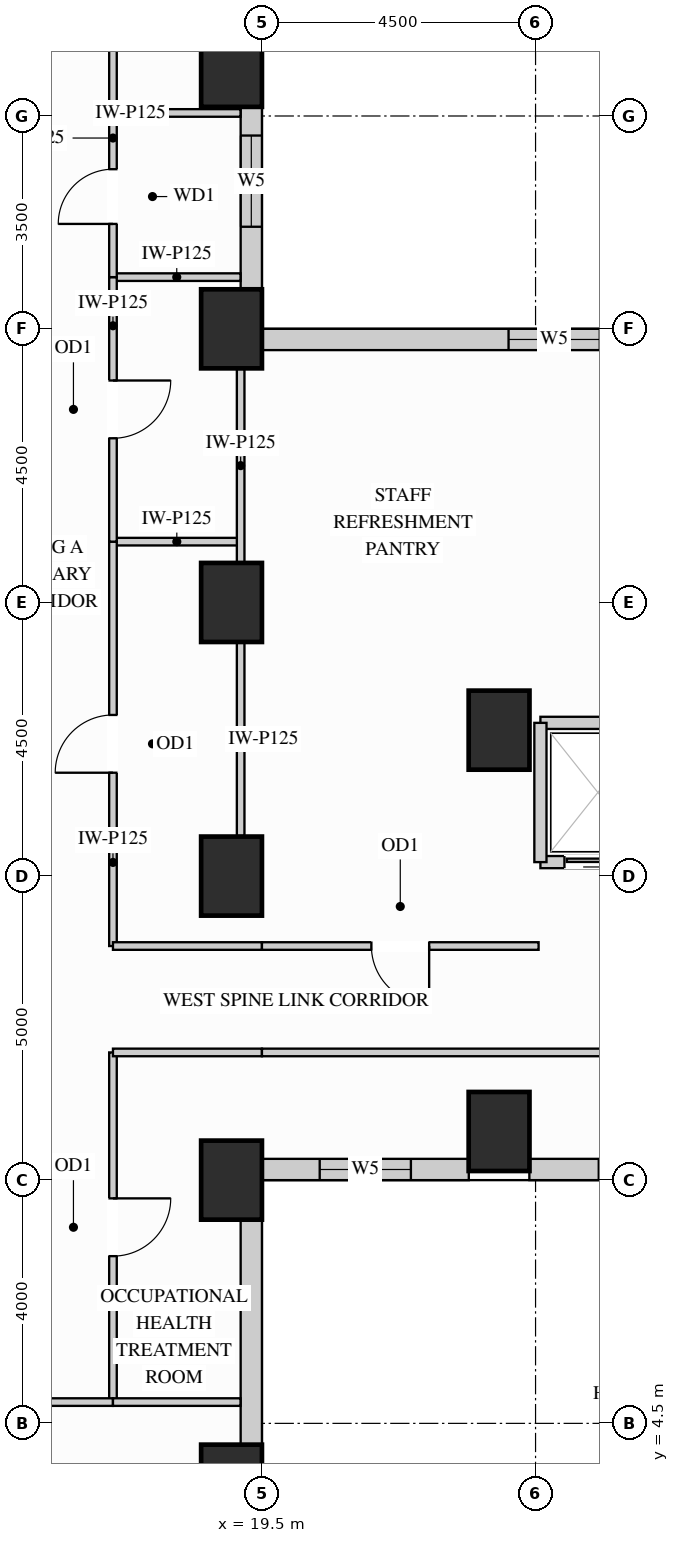
"""IFC4 building model, lengths in metres.
Left out: names, types, materials, properties, quantities, classifications, styles, units other than length and angle.
Written with IfcOpenShell. Run it as: python <this file> out.ifc"""

import sys

from ifc_helpers import new_model, si_unit, direction, frame, frame_2d, origin, origin_2d, place, context, subcontext, project, spatial, rectangle, extrude, source, transform, mapped, element, fill, save


model = new_model("IFC4")
c1 = context("Model", 3, precision=1e-05, world=origin(), true_north=direction((0.0, 1.0)))
c2 = subcontext(c1, "Body", "Model", "MODEL_VIEW")
j1 = project(units=[si_unit("LENGTHUNIT", "METRE"), si_unit("PLANEANGLEUNIT", "RADIAN")], contexts=[c1])
p1 = place(None, origin())
s1 = spatial("IfcSite", under=j1, at=p1, CompositionType="ELEMENT")
p2 = place(p1, origin())
s2 = spatial("IfcBuilding", under=s1, at=p2, CompositionType="ELEMENT")
p3 = place(p2, frame((0.0, 0.0, 33.3)))
s3 = spatial("IfcBuildingStorey", under=s2, at=p3, CompositionType="ELEMENT", Elevation=33.3)
m1 = source(origin(), c2, "Body", "SweptSolid", [
    extrude(rectangle(XDim=1.0, YDim=1.3, at=origin_2d()), origin(), (0.0, 0.0, 1.0), 3.38),
])
for number, where, z_axis, x_axis in (
    (1, (19.0, 13.5, 0.0), (0.0, 0.0, 1.0), (1.0, 0.0, 0.0)),
    (2, (19.0, 18.0, 0.0), (0.0, 0.0, 1.0), (1.0, 0.0, 0.0)),
    (3, (19.0, 22.5, 0.0), (0.0, 0.0, 1.0), (1.0, 0.0, 0.0)),
    (4, (19.0, 26.8, 0.0), (0.0, 0.0, 1.0), (1.0, 0.0, 0.0)),
    (5, (19.0, 3.5, 0.0), (0.0, 0.0, 1.0), (1.0, 0.0, 0.0)),
    (6, (19.0, 8.5, 0.0), (0.0, 0.0, 1.0), (1.0, 0.0, 0.0)),
    (7, (23.4, 15.9, 0.0), (0.0, 0.0, 1.0), (1.0, 0.0, 0.0)),
    (8, (23.4, 9.3, 0.0), (0.0, 0.0, 1.0), (1.0, 0.0, 0.0)),
):
    element("IfcColumn", number, at=place(p3, frame(where, z_axis=z_axis, x_axis=x_axis)), inside=s3, PredefinedType="COLUMN", context=c2, shape_type="MappedRepresentation", body=[
        mapped(m1, transform((0.0, 0.0, 0.0), x_axis=(1.0, 0.0, 0.0), y_axis=(0.0, 1.0, 0.0), z_axis=(0.0, 0.0, 1.0))),
    ])
m2 = source(origin(), c2, "Body", "SweptSolid", [
    extrude(rectangle(XDim=3.704, YDim=0.35, at=frame_2d((1.852, 0.0))), origin(), (0.0, 0.0, 1.0), 2.51),
])
p4 = place(p3, frame((19.325, 4.148, 0.0), z_axis=(0.0, 0.0, 1.0), x_axis=(0.0, 1.0, 0.0)))
e9 = element("IfcWall", 9, at=p4, inside=s3, PredefinedType="SOLIDWALL", context=c2, shape_type="MappedRepresentation", body=[
    mapped(m2, transform((0.0, 0.0, 0.0), x_axis=(1.0, 0.0, 0.0), y_axis=(0.0, 1.0, 0.0), z_axis=(0.0, 0.0, 1.0))),
])
p5 = place(p3, frame((19.498, 8.675, 0.0), z_axis=(0.0, 0.0, 1.0), x_axis=(1.0, 0.0, 0.0)))
e10 = element("IfcWall", 10, at=p5, inside=s3, PredefinedType="SOLIDWALL", context=c2, shape_type="SweptSolid", body=[
    extrude(rectangle(XDim=3.404, YDim=0.35, at=frame_2d((1.702, 0.0))), origin(), (0.0, 0.0, 1.0), 3.365),
])
p6 = place(p5, frame((0.952, 0.0, 0.78)))
e11 = element("IfcOpeningElement", 11, at=p6, cuts=e10, PredefinedType="OPENING", context=c2, shape_type="SweptSolid", body=[
    extrude(rectangle(XDim=1.5, YDim=2.0, at=frame_2d((0.75, 1.0))), frame((0.0, 0.185, 0.0), z_axis=(0.0, -1.0, 0.0), x_axis=(1.0, 0.0, 0.0)), (0.0, 0.0, 1.0), 0.37),
])
p7 = place(p3, frame((23.898, 8.675, 0.0), z_axis=(0.0, 0.0, 1.0), x_axis=(1.0, 0.0, 0.0)))
e12 = element("IfcWall", 12, at=p7, inside=s3, PredefinedType="SOLIDWALL", context=c2, shape_type="SweptSolid", body=[
    extrude(rectangle(XDim=6.104, YDim=0.35, at=frame_2d((3.052, 0.0))), origin(), (0.0, 0.0, 1.0), 3.365),
])
p8 = place(p7, frame((1.141, 0.0, 0.78)))
e13 = element("IfcOpeningElement", 13, at=p8, cuts=e12, PredefinedType="OPENING", context=c2, shape_type="SweptSolid", body=[
    extrude(rectangle(XDim=1.5, YDim=2.0, at=frame_2d((0.75, 1.0))), frame((0.0, 0.185, 0.0), z_axis=(0.0, -1.0, 0.0), x_axis=(1.0, 0.0, 0.0)), (0.0, 0.0, 1.0), 0.37),
])
p9 = place(p7, frame((3.463, 0.0, 0.78)))
e14 = element("IfcOpeningElement", 14, at=p9, cuts=e12, PredefinedType="OPENING", context=c2, shape_type="SweptSolid", body=[
    extrude(rectangle(XDim=1.5, YDim=2.0, at=frame_2d((0.75, 1.0))), frame((0.0, 0.185, 0.0), z_axis=(0.0, -1.0, 0.0), x_axis=(1.0, 0.0, 0.0)), (0.0, 0.0, 1.0), 0.37),
])
p10 = place(p3, frame((34.352, 22.325, 0.0), z_axis=(0.0, 0.0, 1.0), x_axis=(-1.0, 0.0, 0.0)))
e15 = element("IfcWall", 15, at=p10, inside=s3, PredefinedType="SOLIDWALL", context=c2, shape_type="SweptSolid", body=[
    extrude(rectangle(XDim=14.854, YDim=0.35, at=frame_2d((7.427, 0.0))), origin(), (0.0, 0.0, 1.0), 3.365),
])
p11 = place(p10, frame((4.058, 0.0, 0.78)))
e16 = element("IfcOpeningElement", 16, at=p11, cuts=e15, PredefinedType="OPENING", context=c2, shape_type="SweptSolid", body=[
    extrude(rectangle(XDim=1.5, YDim=2.0, at=frame_2d((0.75, 1.0))), frame((0.0, 0.185, 0.0), z_axis=(0.0, -1.0, 0.0), x_axis=(1.0, 0.0, 0.0)), (0.0, 0.0, 1.0), 0.37),
])
p12 = place(p10, frame((9.296, 0.0, 0.78)))
e17 = element("IfcOpeningElement", 17, at=p12, cuts=e15, PredefinedType="OPENING", context=c2, shape_type="SweptSolid", body=[
    extrude(rectangle(XDim=1.5, YDim=2.0, at=frame_2d((0.75, 1.0))), frame((0.0, 0.185, 0.0), z_axis=(0.0, -1.0, 0.0), x_axis=(1.0, 0.0, 0.0)), (0.0, 0.0, 1.0), 0.37),
])
p13 = place(p3, frame((19.325, 23.148, 0.0), z_axis=(0.0, 0.0, 1.0), x_axis=(0.0, 1.0, 0.0)))
e18 = element("IfcWall", 18, at=p13, inside=s3, PredefinedType="SOLIDWALL", context=c2, shape_type="SweptSolid", body=[
    extrude(rectangle(XDim=3.004, YDim=0.35, at=frame_2d((1.502, 0.0))), origin(), (0.0, 0.0, 1.0), 2.51),
])
p14 = place(p13, frame((1.031, 0.0, 0.78)))
e19 = element("IfcOpeningElement", 19, at=p14, cuts=e18, PredefinedType="OPENING", context=c2, shape_type="SweptSolid", body=[
    extrude(rectangle(XDim=1.5, YDim=1.55, at=frame_2d((0.75, 0.775))), frame((0.0, 0.185, 0.0), z_axis=(0.0, -1.0, 0.0), x_axis=(1.0, 0.0, 0.0)), (0.0, 0.0, 1.0), 0.37),
])
m3 = source(origin(), c2, "Body", "SweptSolid", [
    extrude(rectangle(XDim=2.1, YDim=0.125, at=frame_2d((1.05, 0.0))), origin(), (0.0, 0.0, 1.0), 3.365),
])
p15 = place(p3, frame((17.05, 19.0, 0.0), z_axis=(0.0, 0.0, 1.0), x_axis=(1.0, 0.0, 0.0)))
e20 = element("IfcWall", 20, at=p15, inside=s3, PredefinedType="PARTITIONING", context=c2, shape_type="MappedRepresentation", body=[
    mapped(m3, transform((0.0, 0.0, 0.0), x_axis=(1.0, 0.0, 0.0), y_axis=(0.0, 1.0, 0.0), z_axis=(0.0, 0.0, 1.0))),
])
m4 = source(origin(), c2, "Body", "SweptSolid", [
    extrude(rectangle(XDim=2.098, YDim=0.125, at=frame_2d((1.049, 0.0))), origin(), (0.0, 0.0, 1.0), 3.365),
])
for number, where, z_axis, x_axis in (
    (21, (17.05, 23.35, 0.0), (0.0, 0.0, 1.0), (1.0, 0.0, 0.0)),
    (22, (17.05, 26.05, 0.0), (0.0, 0.0, 1.0), (1.0, 0.0, 0.0)),
):
    element("IfcWall", number, at=place(p3, frame(where, z_axis=z_axis, x_axis=x_axis)), inside=s3, PredefinedType="PARTITIONING", context=c2, shape_type="MappedRepresentation", body=[
        mapped(m4, transform((0.0, 0.0, 0.0), x_axis=(1.0, 0.0, 0.0), y_axis=(0.0, 1.0, 0.0), z_axis=(0.0, 0.0, 1.0))),
    ])
m5 = source(origin(), c2, "Body", "SweptSolid", [
    extrude(rectangle(XDim=3.18, YDim=0.125, at=frame_2d((1.59, 0.0))), origin(), (0.0, 0.0, 1.0), 2.67),
])
for number, where, z_axis, x_axis in (
    (23, (19.15, 14.16, 0.0), (0.0, 0.0, 1.0), (0.0, 1.0, 0.0)),
    (24, (19.15, 18.66, 0.0), (0.0, 0.0, 1.0), (0.0, 1.0, 0.0)),
):
    element("IfcWall", number, at=place(p3, frame(where, z_axis=z_axis, x_axis=x_axis)), inside=s3, PredefinedType="PARTITIONING", context=c2, shape_type="MappedRepresentation", body=[
        mapped(m5, transform((0.0, 0.0, 0.0), x_axis=(1.0, 0.0, 0.0), y_axis=(0.0, 1.0, 0.0), z_axis=(0.0, 0.0, 1.0))),
    ])
p16 = place(p3, frame((17.05, 12.35, 0.0), z_axis=(0.0, 0.0, 1.0), x_axis=(0.0, 1.0, 0.0)))
e25 = element("IfcWall", 25, at=p16, inside=s3, PredefinedType="PARTITIONING", context=c2, shape_type="SweptSolid", body=[
    extrude(rectangle(XDim=6.65, YDim=0.125, at=frame_2d((3.325, 0.0))), origin(), (0.0, 0.0, 1.0), 3.365),
])
p17 = place(p16, frame((2.85, 0.0, 0.0)))
e26 = element("IfcOpeningElement", 26, at=p17, cuts=e25, PredefinedType="OPENING", context=c2, shape_type="SweptSolid", body=[
    extrude(rectangle(XDim=0.95, YDim=2.15, at=frame_2d((0.475, 1.075))), frame((0.0, 0.073, 0.0), z_axis=(0.0, -1.0, 0.0), x_axis=(1.0, 0.0, 0.0)), (0.0, 0.0, 1.0), 0.145),
])
p18 = place(p3, frame((17.05, 19.0, 0.0), z_axis=(0.0, 0.0, 1.0), x_axis=(0.0, 1.0, 0.0)))
e27 = element("IfcWall", 27, at=p18, inside=s3, PredefinedType="PARTITIONING", context=c2, shape_type="SweptSolid", body=[
    extrude(rectangle(XDim=4.35, YDim=0.125, at=frame_2d((2.175, 0.0))), origin(), (0.0, 0.0, 1.0), 3.365),
])
p19 = place(p18, frame((1.7, 0.0, 0.0)))
e28 = element("IfcOpeningElement", 28, at=p19, cuts=e27, PredefinedType="OPENING", context=c2, shape_type="SweptSolid", body=[
    extrude(rectangle(XDim=0.95, YDim=2.15, at=frame_2d((0.475, 1.075))), frame((0.0, 0.073, 0.0), z_axis=(0.0, -1.0, 0.0), x_axis=(1.0, 0.0, 0.0)), (0.0, 0.0, 1.0), 0.145),
])
p20 = place(p3, frame((17.05, 26.05, 0.0), z_axis=(0.0, 0.0, 1.0), x_axis=(0.0, 1.0, 0.0)))
e29 = element("IfcWall", 29, at=p20, inside=s3, PredefinedType="PARTITIONING", context=c2, shape_type="SweptSolid", body=[
    extrude(rectangle(XDim=7.2, YDim=0.125, at=frame_2d((3.6, 0.0))), origin(), (0.0, 0.0, 1.0), 3.365),
])
p21 = place(p20, frame((3.125, 0.0, 0.0)))
e30 = element("IfcOpeningElement", 30, at=p21, cuts=e29, PredefinedType="OPENING", context=c2, shape_type="SweptSolid", body=[
    extrude(rectangle(XDim=0.95, YDim=2.15, at=frame_2d((0.475, 1.075))), frame((0.0, 0.073, 0.0), z_axis=(0.0, -1.0, 0.0), x_axis=(1.0, 0.0, 0.0)), (0.0, 0.0, 1.0), 0.145),
])
p22 = place(p3, frame((17.05, 4.85, 0.0), z_axis=(0.0, 0.0, 1.0), x_axis=(0.0, 1.0, 0.0)))
e31 = element("IfcWall", 31, at=p22, inside=s3, PredefinedType="PARTITIONING", context=c2, shape_type="SweptSolid", body=[
    extrude(rectangle(XDim=5.75, YDim=0.125, at=frame_2d((2.875, 0.0))), origin(), (0.0, 0.0, 1.0), 3.365),
])
p23 = place(p22, frame((2.4, 0.0, 0.0)))
e32 = element("IfcOpeningElement", 32, at=p23, cuts=e31, PredefinedType="OPENING", context=c2, shape_type="SweptSolid", body=[
    extrude(rectangle(XDim=0.95, YDim=2.15, at=frame_2d((0.475, 1.075))), frame((0.0, 0.073, 0.0), z_axis=(0.0, -1.0, 0.0), x_axis=(1.0, 0.0, 0.0)), (0.0, 0.0, 1.0), 0.145),
])
p24 = place(p3, frame((17.05, 23.35, 0.0), z_axis=(0.0, 0.0, 1.0), x_axis=(0.0, 1.0, 0.0)))
e33 = element("IfcWall", 33, at=p24, inside=s3, PredefinedType="PARTITIONING", context=c2, shape_type="SweptSolid", body=[
    extrude(rectangle(XDim=2.7, YDim=0.125, at=frame_2d((1.35, 0.0))), origin(), (0.0, 0.0, 1.0), 3.365),
])
p25 = place(p24, frame((0.875, 0.0, 0.0)))
e34 = element("IfcOpeningElement", 34, at=p25, cuts=e33, PredefinedType="OPENING", context=c2, shape_type="SweptSolid", body=[
    extrude(rectangle(XDim=0.9, YDim=2.15, at=frame_2d((0.45, 1.075))), frame((0.0, 0.073, 0.0), z_axis=(0.0, -1.0, 0.0), x_axis=(1.0, 0.0, 0.0)), (0.0, 0.0, 1.0), 0.145),
])
m6 = source(origin(), c2, "Body", "SweptSolid", [
    extrude(rectangle(XDim=2.45, YDim=0.125, at=frame_2d((1.225, 0.0))), origin(), (0.0, 0.0, 1.0), 3.365),
])
p26 = place(p3, frame((17.05, 12.35, 0.0), z_axis=(0.0, 0.0, 1.0), x_axis=(1.0, 0.0, 0.0)))
e35 = element("IfcWall", 35, at=p26, inside=s3, PredefinedType="PARTITIONING", context=c2, shape_type="MappedRepresentation", body=[
    mapped(m6, transform((0.0, 0.0, 0.0), x_axis=(1.0, 0.0, 0.0), y_axis=(0.0, 1.0, 0.0), z_axis=(0.0, 0.0, 1.0))),
])
p27 = place(p3, frame((19.5, 12.35, 0.0), z_axis=(0.0, 0.0, 1.0), x_axis=(1.0, 0.0, 0.0)))
e36 = element("IfcWall", 36, at=p27, inside=s3, PredefinedType="PARTITIONING", context=c2, shape_type="SweptSolid", body=[
    extrude(rectangle(XDim=4.55, YDim=0.125, at=frame_2d((2.275, 0.0))), origin(), (0.0, 0.0, 1.0), 3.365),
])
p28 = place(p27, frame((1.8, 0.0, 0.0)))
e37 = element("IfcOpeningElement", 37, at=p28, cuts=e36, PredefinedType="OPENING", context=c2, shape_type="SweptSolid", body=[
    extrude(rectangle(XDim=0.95, YDim=2.15, at=frame_2d((0.475, 1.075))), frame((0.0, 0.073, 0.0), z_axis=(0.0, -1.0, 0.0), x_axis=(1.0, 0.0, 0.0)), (0.0, 0.0, 1.0), 0.145),
])
p29 = place(p3, frame((17.05, 10.6, 0.0), z_axis=(0.0, 0.0, 1.0), x_axis=(1.0, 0.0, 0.0)))
e38 = element("IfcWall", 38, at=p29, inside=s3, PredefinedType="PARTITIONING", context=c2, shape_type="MappedRepresentation", body=[
    mapped(m6, transform((0.0, 0.0, 0.0), x_axis=(1.0, 0.0, 0.0), y_axis=(0.0, 1.0, 0.0), z_axis=(0.0, 0.0, 1.0))),
])
p30 = place(p3, frame((19.5, 10.6, 0.0), z_axis=(0.0, 0.0, 1.0), x_axis=(1.0, 0.0, 0.0)))
e39 = element("IfcWall", 39, at=p30, inside=s3, PredefinedType="PARTITIONING", context=c2, shape_type="SweptSolid", body=[
    extrude(rectangle(XDim=14.9, YDim=0.125, at=frame_2d((7.45, 0.0))), origin(), (0.0, 0.0, 1.0), 3.365),
])
p31 = place(p30, frame((6.975, 0.0, 0.0)))
e40 = element("IfcOpeningElement", 40, at=p31, cuts=e39, PredefinedType="OPENING", context=c2, shape_type="SweptSolid", body=[
    extrude(rectangle(XDim=0.95, YDim=2.15, at=frame_2d((0.475, 1.075))), frame((0.0, 0.073, 0.0), z_axis=(0.0, -1.0, 0.0), x_axis=(1.0, 0.0, 0.0)), (0.0, 0.0, 1.0), 0.145),
])
p32 = place(p3, frame((2.45, 4.85, 0.0), z_axis=(0.0, 0.0, 1.0), x_axis=(1.0, 0.0, 0.0)))
e41 = element("IfcWall", 41, at=p32, inside=s3, PredefinedType="PARTITIONING", context=c2, shape_type="SweptSolid", body=[
    extrude(rectangle(XDim=14.6, YDim=0.125, at=frame_2d((7.3, 0.0))), origin(), (0.0, 0.0, 1.0), 2.828),
])
p33 = place(p32, frame((6.825, 0.0, 0.0)))
e42 = element("IfcOpeningElement", 42, at=p33, cuts=e41, PredefinedType="OPENING", context=c2, shape_type="SweptSolid", body=[
    extrude(rectangle(XDim=0.95, YDim=2.15, at=frame_2d((0.475, 1.075))), frame((0.0, 0.073, 0.0), z_axis=(0.0, -1.0, 0.0), x_axis=(1.0, 0.0, 0.0)), (0.0, 0.0, 1.0), 0.145),
])
m7 = source(origin(), c2, "Body", "SweptSolid", [
    extrude(rectangle(XDim=2.098, YDim=0.125, at=frame_2d((1.049, 0.0))), origin(), (0.0, 0.0, 1.0), 2.828),
])
p34 = place(p3, frame((17.05, 4.85, 0.0), z_axis=(0.0, 0.0, 1.0), x_axis=(1.0, 0.0, 0.0)))
e43 = element("IfcWall", 43, at=p34, inside=s3, PredefinedType="PARTITIONING", context=c2, shape_type="MappedRepresentation", body=[
    mapped(m7, transform((0.0, 0.0, 0.0), x_axis=(1.0, 0.0, 0.0), y_axis=(0.0, 1.0, 0.0), z_axis=(0.0, 0.0, 1.0))),
])
m8 = source(origin(), c2, "Body", "SweptSolid", [
    extrude(rectangle(XDim=1.89, YDim=0.2, at=frame_2d((0.945, 0.0))), origin(), (0.0, 0.0, 1.0), 2.67),
])
p35 = place(p3, frame((24.08, 16.02, 0.0), z_axis=(0.0, 0.0, 1.0), x_axis=(1.0, 0.0, 0.0)))
e44 = element("IfcWall", 44, at=p35, inside=s3, PredefinedType="PARTITIONING", context=c2, shape_type="MappedRepresentation", body=[
    mapped(m8, transform((0.0, 0.0, 0.0), x_axis=(1.0, 0.0, 0.0), y_axis=(0.0, 1.0, 0.0), z_axis=(0.0, 0.0, 1.0))),
])
p36 = place(p3, frame((24.08, 13.73, 0.0), z_axis=(0.0, 0.0, 1.0), x_axis=(1.0, 0.0, 0.0)))
e45 = element("IfcWall", 45, at=p36, inside=s3, PredefinedType="PARTITIONING", context=c2, shape_type="SweptSolid", body=[
    extrude(rectangle(XDim=1.89, YDim=0.2, at=frame_2d((0.945, 0.0))), origin(), (0.0, 0.0, 1.0), 2.446),
])
p37 = place(p36, frame((0.395, 0.0, 0.0)))
e46 = element("IfcOpeningElement", 46, at=p37, cuts=e45, PredefinedType="OPENING", context=c2, shape_type="SweptSolid", body=[
    extrude(rectangle(XDim=1.1, YDim=2.2, at=frame_2d((0.55, 1.1))), frame((0.0, 0.11, 0.0), z_axis=(0.0, -1.0, 0.0), x_axis=(1.0, 0.0, 0.0)), (0.0, 0.0, 1.0), 0.22),
])
m9 = source(origin(), c2, "Body", "SweptSolid", [
    extrude(rectangle(XDim=2.29, YDim=0.2, at=frame_2d((1.145, 0.0))), origin(), (0.0, 0.0, 1.0), 3.365),
])
p38 = place(p3, frame((24.08, 13.73, 0.0), z_axis=(0.0, 0.0, 1.0), x_axis=(0.0, 1.0, 0.0)))
e47 = element("IfcWall", 47, at=p38, inside=s3, PredefinedType="PARTITIONING", context=c2, shape_type="MappedRepresentation", body=[
    mapped(m9, transform((0.0, 0.0, 0.0), x_axis=(1.0, 0.0, 0.0), y_axis=(0.0, 1.0, 0.0), z_axis=(0.0, 0.0, 1.0))),
])
m10 = source(origin(), c2, "Body", "SweptSolid", [
    extrude(rectangle(XDim=1.1, YDim=2.2, at=frame_2d((0.55, 1.1))), frame((0.0, 0.025, 0.0), z_axis=(0.0, -1.0, 0.0), x_axis=(1.0, 0.0, 0.0)), (0.0, 0.0, 1.0), 0.05),
])
p39 = place(p37, origin())
e48 = element("IfcDoor", 48, at=p39, inside=s3, OperationType="SLIDING_TO_LEFT", PredefinedType="DOOR", context=c2, shape_type="MappedRepresentation", body=[
    mapped(m10, transform((0.0, 0.0, 0.0), x_axis=(1.0, 0.0, 0.0), y_axis=(0.0, 1.0, 0.0), z_axis=(0.0, 0.0, 1.0))),
])
fill(e46, e48)
m11 = source(origin(), c2, "Body", "SweptSolid", [
    extrude(rectangle(XDim=0.95, YDim=2.15, at=frame_2d((0.475, 1.075))), frame((0.0, 0.025, 0.0), z_axis=(0.0, -1.0, 0.0), x_axis=(1.0, 0.0, 0.0)), (0.0, 0.0, 1.0), 0.05),
])
p40 = place(p23, origin())
e49 = element("IfcDoor", 49, at=p40, inside=s3, OperationType="SINGLE_SWING_RIGHT", PredefinedType="DOOR", context=c2, shape_type="MappedRepresentation", body=[
    mapped(m11, transform((0.0, 0.0, 0.0), x_axis=(1.0, 0.0, 0.0), y_axis=(0.0, 1.0, 0.0), z_axis=(0.0, 0.0, 1.0))),
])
fill(e32, e49)
p41 = place(p17, origin())
e50 = element("IfcDoor", 50, at=p41, inside=s3, OperationType="SINGLE_SWING_LEFT", PredefinedType="DOOR", context=c2, shape_type="MappedRepresentation", body=[
    mapped(m11, transform((0.0, 0.0, 0.0), x_axis=(1.0, 0.0, 0.0), y_axis=(0.0, 1.0, 0.0), z_axis=(0.0, 0.0, 1.0))),
])
fill(e26, e50)
p42 = place(p19, origin())
e51 = element("IfcDoor", 51, at=p42, inside=s3, OperationType="SINGLE_SWING_RIGHT", PredefinedType="DOOR", context=c2, shape_type="MappedRepresentation", body=[
    mapped(m11, transform((0.0, 0.0, 0.0), x_axis=(1.0, 0.0, 0.0), y_axis=(0.0, 1.0, 0.0), z_axis=(0.0, 0.0, 1.0))),
])
fill(e28, e51)
p43 = place(p28, origin())
e52 = element("IfcDoor", 52, at=p43, inside=s3, OperationType="SINGLE_SWING_RIGHT", PredefinedType="DOOR", context=c2, shape_type="MappedRepresentation", body=[
    mapped(m11, transform((0.0, 0.0, 0.0), x_axis=(1.0, 0.0, 0.0), y_axis=(0.0, 1.0, 0.0), z_axis=(0.0, 0.0, 1.0))),
])
fill(e37, e52)
m12 = source(origin(), c2, "Body", "SweptSolid", [
    extrude(rectangle(XDim=0.9, YDim=2.15, at=frame_2d((0.45, 1.075))), frame((0.0, 0.025, 0.0), z_axis=(0.0, -1.0, 0.0), x_axis=(1.0, 0.0, 0.0)), (0.0, 0.0, 1.0), 0.05),
])
p44 = place(p25, origin())
e53 = element("IfcDoor", 53, at=p44, inside=s3, OperationType="SINGLE_SWING_LEFT", PredefinedType="DOOR", context=c2, shape_type="MappedRepresentation", body=[
    mapped(m12, transform((0.0, 0.0, 0.0), x_axis=(1.0, 0.0, 0.0), y_axis=(0.0, 1.0, 0.0), z_axis=(0.0, 0.0, 1.0))),
])
fill(e34, e53)
m13 = source(origin(), c2, "Body", "SweptSolid", [
    extrude(rectangle(XDim=1.5, YDim=2.0, at=frame_2d((0.75, 1.0))), frame((0.0, 0.03, 0.0), z_axis=(0.0, -1.0, 0.0), x_axis=(1.0, 0.0, 0.0)), (0.0, 0.0, 1.0), 0.06),
])
p45 = place(p6, origin())
e54 = element("IfcWindow", 54, at=p45, inside=s3, PartitioningType="SINGLE_PANEL", PredefinedType="WINDOW", context=c2, shape_type="MappedRepresentation", body=[
    mapped(m13, transform((0.0, 0.0, 0.0), x_axis=(1.0, 0.0, 0.0), y_axis=(0.0, 1.0, 0.0), z_axis=(0.0, 0.0, 1.0))),
])
fill(e11, e54)
p46 = place(p8, origin())
e55 = element("IfcWindow", 55, at=p46, inside=s3, PartitioningType="SINGLE_PANEL", PredefinedType="WINDOW", context=c2, shape_type="MappedRepresentation", body=[
    mapped(m13, transform((0.0, 0.0, 0.0), x_axis=(1.0, 0.0, 0.0), y_axis=(0.0, 1.0, 0.0), z_axis=(0.0, 0.0, 1.0))),
])
fill(e13, e55)
p47 = place(p12, origin())
e56 = element("IfcWindow", 56, at=p47, inside=s3, PartitioningType="SINGLE_PANEL", PredefinedType="WINDOW", context=c2, shape_type="MappedRepresentation", body=[
    mapped(m13, transform((0.0, 0.0, 0.0), x_axis=(1.0, 0.0, 0.0), y_axis=(0.0, 1.0, 0.0), z_axis=(0.0, 0.0, 1.0))),
])
fill(e17, e56)
m14 = source(origin(), c2, "Body", "SweptSolid", [
    extrude(rectangle(XDim=1.5, YDim=1.55, at=frame_2d((0.75, 0.775))), frame((0.0, 0.03, 0.0), z_axis=(0.0, -1.0, 0.0), x_axis=(1.0, 0.0, 0.0)), (0.0, 0.0, 1.0), 0.06),
])
p48 = place(p14, origin())
e57 = element("IfcWindow", 57, at=p48, inside=s3, PartitioningType="SINGLE_PANEL", PredefinedType="WINDOW", context=c2, shape_type="MappedRepresentation", body=[
    mapped(m14, transform((0.0, 0.0, 0.0), x_axis=(1.0, 0.0, 0.0), y_axis=(0.0, 1.0, 0.0), z_axis=(0.0, 0.0, 1.0))),
])
fill(e19, e57)
save(model, sys.argv[1])
